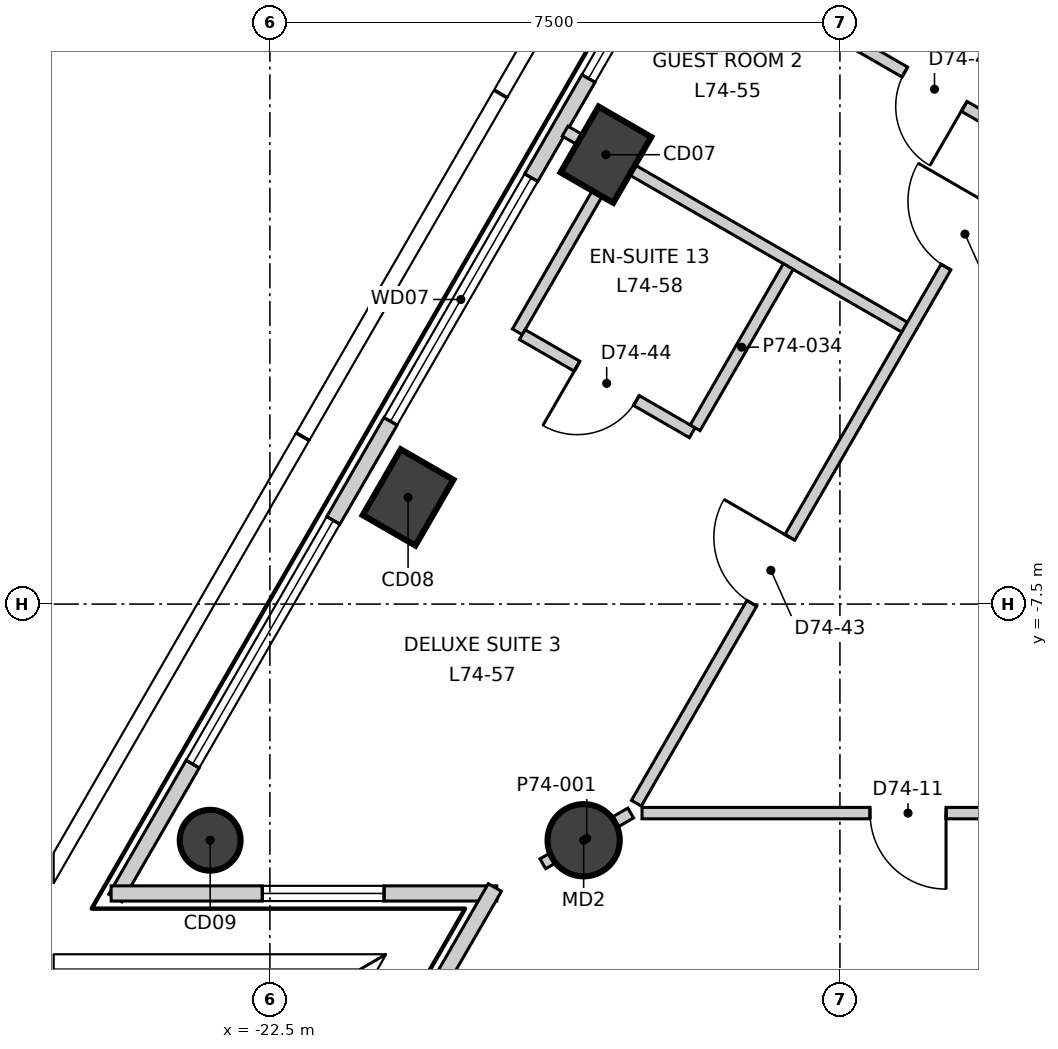
"""IFC4 building model, lengths in metres.
Left out: names, types, materials, properties, quantities, classifications, styles, units other than length and angle.
Written with IfcOpenShell. Run it as: python <this file> out.ifc"""

import sys

from ifc_helpers import new_model, si_unit, direction, frame, frame_2d, origin, origin_2d, place, context, subcontext, project, spatial, rectangle, circle, extrude, element, fill, save


model = new_model("IFC4")
c1 = context("Model", 3, precision=1e-05, world=origin(), true_north=direction((0.0, 1.0)))
c2 = subcontext(c1, "Body", "Model", "MODEL_VIEW")
j1 = project(units=[si_unit("LENGTHUNIT", "METRE"), si_unit("PLANEANGLEUNIT", "RADIAN")], contexts=[c1])
p1 = place(None, origin())
s1 = spatial("IfcSite", under=j1, at=p1, CompositionType="ELEMENT")
p2 = place(p1, origin())
s2 = spatial("IfcBuilding", under=s1, at=p2, CompositionType="ELEMENT")
p3 = place(p2, frame((0.0, 0.0, 311.5)))
s3 = spatial("IfcBuildingStorey", under=s2, at=p3, CompositionType="ELEMENT", Elevation=311.5)
for number, where, z_axis, x_axis in (
    (1, (-18.079, -1.588, -0.3), (0.0, 0.0, 1.0), (0.5, 0.866, 0.0)),
    (2, (-20.682, -6.097, -0.3), (0.0, 0.0, 1.0), (0.5, 0.866, 0.0)),
):
    element("IfcColumn", number, at=place(p3, frame(where, z_axis=z_axis, x_axis=x_axis)), inside=s3, PredefinedType="COLUMN", context=c2, shape_type="SweptSolid", body=[
        extrude(rectangle(XDim=1.0, YDim=0.8, at=origin_2d()), origin(), (0.0, 0.0, 1.0), 3.6),
    ])
p4 = place(p3, frame((-23.286, -10.607, -0.3), z_axis=(0.0, 0.0, 1.0), x_axis=(0.5, 0.866025403784, 0.0)))
e3 = element("IfcColumn", 3, at=p4, inside=s3, PredefinedType="COLUMN", context=c2, shape_type="SweptSolid", body=[
    extrude(circle(Radius=0.4, at=origin_2d()), origin(), (0.0, 0.0, 1.0), 3.6),
])
p5 = place(p3, frame((-18.372, -10.607, -0.3), z_axis=(0.0, 0.0, 1.0), x_axis=(1.0, 0.0, 0.0)))
e4 = element("IfcColumn", 4, at=p5, inside=s3, PredefinedType="COLUMN", context=c2, shape_type="SweptSolid", body=[
    extrude(circle(Radius=0.475, at=origin_2d()), origin(), (0.0, 0.0, 1.0), 3.6),
])
p6 = place(p3, frame((-2.412, 26.948, 0.0), z_axis=(0.0, 0.0, 1.0), x_axis=(-0.500002044679, -0.866024223285, 0.0)))
e5 = element("IfcWall", 5, at=p6, inside=s3, PredefinedType="ELEMENTEDWALL", context=c2, shape_type="SweptSolid", body=[
    extrude(rectangle(XDim=44.243, YDim=0.2, at=frame_2d((22.122, 0.0))), origin(), (0.0, 0.0, 1.0), 3.3),
])
p7 = place(p6, frame((2.056, 0.0, 0.9)))
e6 = element("IfcOpeningElement", 6, at=p7, cuts=e5, PredefinedType="OPENING", context=c2, shape_type="SweptSolid", body=[
    extrude(rectangle(XDim=3.7, YDim=2.2, at=frame_2d((1.85, 1.1))), frame((0.0, 0.11, 0.0), z_axis=(0.0, -1.0, 0.0), x_axis=(1.0, 0.0, 0.0)), (0.0, 0.0, 1.0), 0.22),
])
p8 = place(p6, frame((7.263, 0.0, 0.9)))
e7 = element("IfcOpeningElement", 7, at=p8, cuts=e5, PredefinedType="OPENING", context=c2, shape_type="SweptSolid", body=[
    extrude(rectangle(XDim=3.7, YDim=2.2, at=frame_2d((1.85, 1.1))), frame((0.0, 0.11, 0.0), z_axis=(0.0, -1.0, 0.0), x_axis=(1.0, 0.0, 0.0)), (0.0, 0.0, 1.0), 0.22),
])
p9 = place(p6, frame((12.471, 0.0, 0.9)))
e8 = element("IfcOpeningElement", 8, at=p9, cuts=e5, PredefinedType="OPENING", context=c2, shape_type="SweptSolid", body=[
    extrude(rectangle(XDim=3.7, YDim=2.2, at=frame_2d((1.85, 1.1))), frame((0.0, 0.11, 0.0), z_axis=(0.0, -1.0, 0.0), x_axis=(1.0, 0.0, 0.0)), (0.0, 0.0, 1.0), 0.22),
])
p10 = place(p6, frame((17.678, 0.0, 0.9)))
e9 = element("IfcOpeningElement", 9, at=p10, cuts=e5, PredefinedType="OPENING", context=c2, shape_type="SweptSolid", body=[
    extrude(rectangle(XDim=3.7, YDim=2.2, at=frame_2d((1.85, 1.1))), frame((0.0, 0.11, 0.0), z_axis=(0.0, -1.0, 0.0), x_axis=(1.0, 0.0, 0.0)), (0.0, 0.0, 1.0), 0.22),
])
p11 = place(p6, frame((22.885, 0.0, 0.9)))
e10 = element("IfcOpeningElement", 10, at=p11, cuts=e5, PredefinedType="OPENING", context=c2, shape_type="SweptSolid", body=[
    extrude(rectangle(XDim=3.7, YDim=2.2, at=frame_2d((1.85, 1.1))), frame((0.0, 0.11, 0.0), z_axis=(0.0, -1.0, 0.0), x_axis=(1.0, 0.0, 0.0)), (0.0, 0.0, 1.0), 0.22),
])
p12 = place(p6, frame((28.092, 0.0, 0.9)))
e11 = element("IfcOpeningElement", 11, at=p12, cuts=e5, PredefinedType="OPENING", context=c2, shape_type="SweptSolid", body=[
    extrude(rectangle(XDim=3.7, YDim=2.2, at=frame_2d((1.85, 1.1))), frame((0.0, 0.11, 0.0), z_axis=(0.0, -1.0, 0.0), x_axis=(1.0, 0.0, 0.0)), (0.0, 0.0, 1.0), 0.22),
])
p13 = place(p6, frame((33.3, 0.0, 0.9)))
e12 = element("IfcOpeningElement", 12, at=p13, cuts=e5, PredefinedType="OPENING", context=c2, shape_type="SweptSolid", body=[
    extrude(rectangle(XDim=3.7, YDim=2.2, at=frame_2d((1.85, 1.1))), frame((0.0, 0.11, 0.0), z_axis=(0.0, -1.0, 0.0), x_axis=(1.0, 0.0, 0.0)), (0.0, 0.0, 1.0), 0.22),
])
p14 = place(p6, frame((38.507, 0.0, 0.9)))
e13 = element("IfcOpeningElement", 13, at=p14, cuts=e5, PredefinedType="OPENING", context=c2, shape_type="SweptSolid", body=[
    extrude(rectangle(XDim=3.7, YDim=2.2, at=frame_2d((1.85, 1.1))), frame((0.0, 0.11, 0.0), z_axis=(0.0, -1.0, 0.0), x_axis=(1.0, 0.0, 0.0)), (0.0, 0.0, 1.0), 0.22),
])
p15 = place(p3, frame((-24.589, -11.307, 0.0), z_axis=(0.0, 0.0, 1.0), x_axis=(1.0, 0.0, 0.0)))
e14 = element("IfcWall", 14, at=p15, inside=s3, PredefinedType="ELEMENTEDWALL", context=c2, shape_type="SweptSolid", body=[
    extrude(rectangle(XDim=5.074, YDim=0.2, at=frame_2d((2.537, 0.0))), origin(), (0.0, 0.0, 1.0), 3.3),
])
p16 = place(p15, frame((1.99, 0.0, 0.9)))
e15 = element("IfcOpeningElement", 15, at=p16, cuts=e14, PredefinedType="OPENING", context=c2, shape_type="SweptSolid", body=[
    extrude(rectangle(XDim=1.6, YDim=2.2, at=frame_2d((0.8, 1.1))), frame((0.0, 0.11, 0.0), z_axis=(0.0, -1.0, 0.0), x_axis=(1.0, 0.0, 0.0)), (0.0, 0.0, 1.0), 0.22),
])
p17 = place(p3, frame((-19.54, -11.229, 0.0), z_axis=(0.0, 0.0, 1.0), x_axis=(-0.499911250765, -0.866076637116, 0.0)))
e16 = element("IfcWall", 16, at=p17, inside=s3, PredefinedType="ELEMENTEDWALL", context=c2, shape_type="SweptSolid", body=[
    extrude(rectangle(XDim=5.075, YDim=0.2, at=frame_2d((2.537, 0.0))), origin(), (0.0, 0.0, 1.0), 3.3),
])
p18 = place(p17, frame((1.39, 0.0, 0.9)))
e17 = element("IfcOpeningElement", 17, at=p18, cuts=e16, PredefinedType="OPENING", context=c2, shape_type="SweptSolid", body=[
    extrude(rectangle(XDim=1.6, YDim=2.2, at=frame_2d((0.8, 1.1))), frame((0.0, 0.11, 0.0), z_axis=(0.0, -1.0, 0.0), x_axis=(1.0, 0.0, 0.0)), (0.0, 0.0, 1.0), 0.22),
])
p19 = place(p3, frame((-18.909, -10.917, 0.0), z_axis=(0.0, 0.0, 1.0), x_axis=(0.865847470378, 0.500308063137, 0.0)))
e18 = element("IfcWall", 18, at=p19, inside=s3, PredefinedType="PARTITIONING", context=c2, shape_type="SweptSolid", body=[
    extrude(rectangle(XDim=1.335, YDim=0.15, at=frame_2d((0.667, 0.0))), origin(), (0.0, 0.0, 1.0), 2.8),
])
p20 = place(p3, frame((-18.616, -1.278, 0.0), z_axis=(0.0, 0.0, 1.0), x_axis=(0.86604134632, -0.499972385701, 0.0)))
e19 = element("IfcWall", 19, at=p20, inside=s3, PredefinedType="PARTITIONING", context=c2, shape_type="SweptSolid", body=[
    extrude(rectangle(XDim=5.158, YDim=0.15, at=frame_2d((2.579, 0.0))), origin(), (0.0, 0.0, 1.0), 3.3),
])
p21 = place(p3, frame((-17.678, -10.12, 0.0), z_axis=(0.0, 0.0, 1.0), x_axis=(0.49998824015, 0.86603219323, 0.0)))
e20 = element("IfcWall", 20, at=p21, inside=s3, PredefinedType="PARTITIONING", context=c2, shape_type="SweptSolid", body=[
    extrude(rectangle(XDim=35.357, YDim=0.15, at=frame_2d((17.678, 0.0))), origin(), (0.0, 0.0, 1.0), 3.3),
])
p22 = place(p21, frame((28.607, 0.0, 0.0)))
e21 = element("IfcOpeningElement", 21, at=p22, cuts=e20, PredefinedType="OPENING", context=c2, shape_type="SweptSolid", body=[
    extrude(rectangle(XDim=1.0, YDim=2.1, at=frame_2d((0.5, 1.05))), frame((0.0, 0.085, 0.0), z_axis=(0.0, -1.0, 0.0), x_axis=(1.0, 0.0, 0.0)), (0.0, 0.0, 1.0), 0.17),
])
p23 = place(p21, frame((13.86, 0.0, 0.0)))
e22 = element("IfcOpeningElement", 22, at=p23, cuts=e20, PredefinedType="OPENING", context=c2, shape_type="SweptSolid", body=[
    extrude(rectangle(XDim=1.0, YDim=2.1, at=frame_2d((0.5, 1.05))), frame((0.0, 0.085, 0.0), z_axis=(0.0, -1.0, 0.0), x_axis=(1.0, 0.0, 0.0)), (0.0, 0.0, 1.0), 0.17),
])
p24 = place(p21, frame((18.96, 0.0, 0.0)))
e23 = element("IfcOpeningElement", 23, at=p24, cuts=e20, PredefinedType="OPENING", context=c2, shape_type="SweptSolid", body=[
    extrude(rectangle(XDim=0.9, YDim=2.1, at=frame_2d((0.45, 1.05))), frame((0.0, 0.085, 0.0), z_axis=(0.0, -1.0, 0.0), x_axis=(1.0, 0.0, 0.0)), (0.0, 0.0, 1.0), 0.17),
])
p25 = place(p21, frame((16.86, 0.0, 0.0)))
e24 = element("IfcOpeningElement", 24, at=p25, cuts=e20, PredefinedType="OPENING", context=c2, shape_type="SweptSolid", body=[
    extrude(rectangle(XDim=0.9, YDim=2.1, at=frame_2d((0.45, 1.05))), frame((0.0, 0.085, 0.0), z_axis=(0.0, -1.0, 0.0), x_axis=(1.0, 0.0, 0.0)), (0.0, 0.0, 1.0), 0.17),
])
p26 = place(p21, frame((8.146, 0.0, 0.0)))
e25 = element("IfcOpeningElement", 25, at=p26, cuts=e20, PredefinedType="OPENING", context=c2, shape_type="SweptSolid", body=[
    extrude(rectangle(XDim=1.0, YDim=2.1, at=frame_2d((0.5, 1.05))), frame((0.0, 0.085, 0.0), z_axis=(0.0, -1.0, 0.0), x_axis=(1.0, 0.0, 0.0)), (0.0, 0.0, 1.0), 0.17),
])
p27 = place(p21, frame((3.038, 0.0, 0.0)))
e26 = element("IfcOpeningElement", 26, at=p27, cuts=e20, PredefinedType="OPENING", context=c2, shape_type="SweptSolid", body=[
    extrude(rectangle(XDim=1.0, YDim=2.1, at=frame_2d((0.5, 1.05))), frame((0.0, 0.085, 0.0), z_axis=(0.0, -1.0, 0.0), x_axis=(1.0, 0.0, 0.0)), (0.0, 0.0, 1.0), 0.17),
])
p28 = place(p3, frame((-17.604, -10.25, 0.0), z_axis=(0.0, 0.0, 1.0), x_axis=(1.0, 0.0, 0.0)))
e27 = element("IfcWall", 27, at=p28, inside=s3, PredefinedType="PARTITIONING", context=c2, shape_type="SweptSolid", body=[
    extrude(rectangle(XDim=35.358, YDim=0.15, at=frame_2d((17.679, 0.0))), origin(), (0.0, 0.0, 1.0), 3.3),
])
p29 = place(p28, frame((3.0, 0.0, 0.0)))
e28 = element("IfcOpeningElement", 28, at=p29, cuts=e27, PredefinedType="OPENING", context=c2, shape_type="SweptSolid", body=[
    extrude(rectangle(XDim=1.0, YDim=2.1, at=frame_2d((0.5, 1.05))), frame((0.0, 0.085, 0.0), z_axis=(0.0, -1.0, 0.0), x_axis=(1.0, 0.0, 0.0)), (0.0, 0.0, 1.0), 0.17),
])
p30 = place(p28, frame((15.14, 0.0, 0.0)))
e29 = element("IfcOpeningElement", 29, at=p30, cuts=e27, PredefinedType="OPENING", context=c2, shape_type="SweptSolid", body=[
    extrude(rectangle(XDim=1.0, YDim=2.1, at=frame_2d((0.5, 1.05))), frame((0.0, 0.085, 0.0), z_axis=(0.0, -1.0, 0.0), x_axis=(1.0, 0.0, 0.0)), (0.0, 0.0, 1.0), 0.17),
])
p31 = place(p28, frame((10.14, 0.0, 0.0)))
e30 = element("IfcOpeningElement", 30, at=p31, cuts=e27, PredefinedType="OPENING", context=c2, shape_type="SweptSolid", body=[
    extrude(rectangle(XDim=0.9, YDim=2.1, at=frame_2d((0.45, 1.05))), frame((0.0, 0.085, 0.0), z_axis=(0.0, -1.0, 0.0), x_axis=(1.0, 0.0, 0.0)), (0.0, 0.0, 1.0), 0.17),
])
p32 = place(p28, frame((12.24, 0.0, 0.0)))
e31 = element("IfcOpeningElement", 31, at=p32, cuts=e27, PredefinedType="OPENING", context=c2, shape_type="SweptSolid", body=[
    extrude(rectangle(XDim=0.9, YDim=2.1, at=frame_2d((0.45, 1.05))), frame((0.0, 0.085, 0.0), z_axis=(0.0, -1.0, 0.0), x_axis=(1.0, 0.0, 0.0)), (0.0, 0.0, 1.0), 0.17),
])
p33 = place(p28, frame((25.654, 0.0, 0.0)))
e32 = element("IfcOpeningElement", 32, at=p33, cuts=e27, PredefinedType="OPENING", context=c2, shape_type="SweptSolid", body=[
    extrude(rectangle(XDim=1.0, YDim=2.1, at=frame_2d((0.5, 1.05))), frame((0.0, 0.085, 0.0), z_axis=(0.0, -1.0, 0.0), x_axis=(1.0, 0.0, 0.0)), (0.0, 0.0, 1.0), 0.17),
])
p34 = place(p28, frame((20.554, 0.0, 0.0)))
e33 = element("IfcOpeningElement", 33, at=p34, cuts=e27, PredefinedType="OPENING", context=c2, shape_type="SweptSolid", body=[
    extrude(rectangle(XDim=0.9, YDim=2.1, at=frame_2d((0.45, 1.05))), frame((0.0, 0.085, 0.0), z_axis=(0.0, -1.0, 0.0), x_axis=(1.0, 0.0, 0.0)), (0.0, 0.0, 1.0), 0.17),
])
p35 = place(p28, frame((22.754, 0.0, 0.0)))
e34 = element("IfcOpeningElement", 34, at=p35, cuts=e27, PredefinedType="OPENING", context=c2, shape_type="SweptSolid", body=[
    extrude(rectangle(XDim=0.9, YDim=2.1, at=frame_2d((0.45, 1.05))), frame((0.0, 0.085, 0.0), z_axis=(0.0, -1.0, 0.0), x_axis=(1.0, 0.0, 0.0)), (0.0, 0.0, 1.0), 0.17),
])
p36 = place(p28, frame((31.168, 0.0, 0.0)))
e35 = element("IfcOpeningElement", 35, at=p36, cuts=e27, PredefinedType="OPENING", context=c2, shape_type="SweptSolid", body=[
    extrude(rectangle(XDim=1.0, YDim=2.1, at=frame_2d((0.5, 1.05))), frame((0.0, 0.085, 0.0), z_axis=(0.0, -1.0, 0.0), x_axis=(1.0, 0.0, 0.0)), (0.0, 0.0, 1.0), 0.17),
])
p37 = place(p3, frame((-19.244, -3.918, 0.0), z_axis=(0.0, 0.0, 1.0), x_axis=(0.500079482444, 0.865979509711, 0.0)))
e36 = element("IfcWall", 36, at=p37, inside=s3, PredefinedType="PARTITIONING", context=c2, shape_type="SweptSolid", body=[
    extrude(rectangle(XDim=2.525, YDim=0.15, at=frame_2d((1.263, 0.0))), origin(), (0.0, 0.0, 1.0), 2.6),
])
p38 = place(p3, frame((-19.179, -3.955, 0.0), z_axis=(0.0, 0.0, 1.0), x_axis=(0.865999760466, -0.500044412901, 0.0)))
e37 = element("IfcWall", 37, at=p38, inside=s3, PredefinedType="PARTITIONING", context=c2, shape_type="SweptSolid", body=[
    extrude(rectangle(XDim=2.582, YDim=0.15, at=frame_2d((1.291, 0.0))), origin(), (0.0, 0.0, 1.0), 3.3),
])
p39 = place(p38, frame((0.832, 0.0, 0.0)))
e38 = element("IfcOpeningElement", 38, at=p39, cuts=e37, PredefinedType="OPENING", context=c2, shape_type="SweptSolid", body=[
    extrude(rectangle(XDim=0.9, YDim=2.1, at=frame_2d((0.45, 1.05))), frame((0.0, 0.085, 0.0), z_axis=(0.0, -1.0, 0.0), x_axis=(1.0, 0.0, 0.0)), (0.0, 0.0, 1.0), 0.17),
])
p40 = place(p3, frame((-16.905, -5.181, 0.0), z_axis=(0.0, 0.0, 1.0), x_axis=(0.500018594424, 0.866014668023, 0.0)))
e39 = element("IfcWall", 39, at=p40, inside=s3, PredefinedType="PARTITIONING", context=c2, shape_type="SweptSolid", body=[
    extrude(rectangle(XDim=2.45, YDim=0.15, at=frame_2d((1.225, 0.0))), origin(), (0.0, 0.0, 1.0), 3.3),
])
p41 = place(p3, frame((-14.866, -0.085, 0.0), z_axis=(0.0, 0.0, 1.0), x_axis=(0.865890381195, -0.500233793095, 0.0)))
e40 = element("IfcWall", 40, at=p41, inside=s3, PredefinedType="PARTITIONING", context=c2, shape_type="SweptSolid", body=[
    extrude(rectangle(XDim=2.507, YDim=0.15, at=frame_2d((1.253, 0.0))), origin(), (0.0, 0.0, 1.0), 3.3),
])
p42 = place(p41, frame((0.832, 0.0, 0.0)))
e41 = element("IfcOpeningElement", 41, at=p42, cuts=e40, PredefinedType="OPENING", context=c2, shape_type="SweptSolid", body=[
    extrude(rectangle(XDim=0.9, YDim=2.1, at=frame_2d((0.45, 1.05))), frame((0.0, 0.085, 0.0), z_axis=(0.0, -1.0, 0.0), x_axis=(1.0, 0.0, 0.0)), (0.0, 0.0, 1.0), 0.17),
])
p43 = place(p12, origin())
e42 = element("IfcWindow", 42, at=p43, inside=s3, PartitioningType="SINGLE_PANEL", PredefinedType="WINDOW", context=c2, shape_type="SweptSolid", body=[
    extrude(rectangle(XDim=3.7, YDim=2.2, at=frame_2d((1.85, 1.1))), frame((0.0, 0.03, 0.0), z_axis=(0.0, -1.0, 0.0), x_axis=(1.0, 0.0, 0.0)), (0.0, 0.0, 1.0), 0.06),
])
fill(e11, e42)
p44 = place(p13, origin())
e43 = element("IfcWindow", 43, at=p44, inside=s3, PartitioningType="SINGLE_PANEL", PredefinedType="WINDOW", context=c2, shape_type="SweptSolid", body=[
    extrude(rectangle(XDim=3.7, YDim=2.2, at=frame_2d((1.85, 1.1))), frame((0.0, 0.03, 0.0), z_axis=(0.0, -1.0, 0.0), x_axis=(1.0, 0.0, 0.0)), (0.0, 0.0, 1.0), 0.06),
])
fill(e12, e43)
p45 = place(p14, origin())
e44 = element("IfcWindow", 44, at=p45, inside=s3, PartitioningType="SINGLE_PANEL", PredefinedType="WINDOW", context=c2, shape_type="SweptSolid", body=[
    extrude(rectangle(XDim=3.7, YDim=2.2, at=frame_2d((1.85, 1.1))), frame((0.0, 0.03, 0.0), z_axis=(0.0, -1.0, 0.0), x_axis=(1.0, 0.0, 0.0)), (0.0, 0.0, 1.0), 0.06),
])
fill(e13, e44)
p46 = place(p16, origin())
e45 = element("IfcWindow", 45, at=p46, inside=s3, PartitioningType="SINGLE_PANEL", PredefinedType="WINDOW", context=c2, shape_type="SweptSolid", body=[
    extrude(rectangle(XDim=1.6, YDim=2.2, at=frame_2d((0.8, 1.1))), frame((0.0, 0.03, 0.0), z_axis=(0.0, -1.0, 0.0), x_axis=(1.0, 0.0, 0.0)), (0.0, 0.0, 1.0), 0.06),
])
fill(e15, e45)
p47 = place(p29, origin())
e46 = element("IfcDoor", 46, at=p47, inside=s3, OperationType="SINGLE_SWING_RIGHT", PredefinedType="DOOR", context=c2, shape_type="SweptSolid", body=[
    extrude(rectangle(XDim=1.0, YDim=2.1, at=frame_2d((0.5, 1.05))), frame((0.0, 0.025, 0.0), z_axis=(0.0, -1.0, 0.0), x_axis=(1.0, 0.0, 0.0)), (0.0, 0.0, 1.0), 0.05),
])
fill(e28, e46)
p48 = place(p26, origin())
e47 = element("IfcDoor", 47, at=p48, inside=s3, OperationType="SINGLE_SWING_LEFT", PredefinedType="DOOR", context=c2, shape_type="SweptSolid", body=[
    extrude(rectangle(XDim=1.0, YDim=2.1, at=frame_2d((0.5, 1.05))), frame((0.0, 0.025, 0.0), z_axis=(0.0, -1.0, 0.0), x_axis=(1.0, 0.0, 0.0)), (0.0, 0.0, 1.0), 0.05),
])
fill(e25, e47)
p49 = place(p42, origin())
e48 = element("IfcDoor", 48, at=p49, inside=s3, OperationType="SINGLE_SWING_RIGHT", PredefinedType="DOOR", context=c2, shape_type="SweptSolid", body=[
    extrude(rectangle(XDim=0.9, YDim=2.1, at=frame_2d((0.45, 1.05))), frame((0.0, 0.025, 0.0), z_axis=(0.0, -1.0, 0.0), x_axis=(1.0, 0.0, 0.0)), (0.0, 0.0, 1.0), 0.05),
])
fill(e41, e48)
p50 = place(p27, origin())
e49 = element("IfcDoor", 49, at=p50, inside=s3, OperationType="SINGLE_SWING_LEFT", PredefinedType="DOOR", context=c2, shape_type="SweptSolid", body=[
    extrude(rectangle(XDim=1.0, YDim=2.1, at=frame_2d((0.5, 1.05))), frame((0.0, 0.025, 0.0), z_axis=(0.0, -1.0, 0.0), x_axis=(1.0, 0.0, 0.0)), (0.0, 0.0, 1.0), 0.05),
])
fill(e26, e49)
p51 = place(p39, origin())
e50 = element("IfcDoor", 50, at=p51, inside=s3, OperationType="SINGLE_SWING_LEFT", PredefinedType="DOOR", context=c2, shape_type="SweptSolid", body=[
    extrude(rectangle(XDim=0.9, YDim=2.1, at=frame_2d((0.45, 1.05))), frame((0.0, 0.025, 0.0), z_axis=(0.0, -1.0, 0.0), x_axis=(1.0, 0.0, 0.0)), (0.0, 0.0, 1.0), 0.05),
])
fill(e38, e50)
save(model, sys.argv[1])
